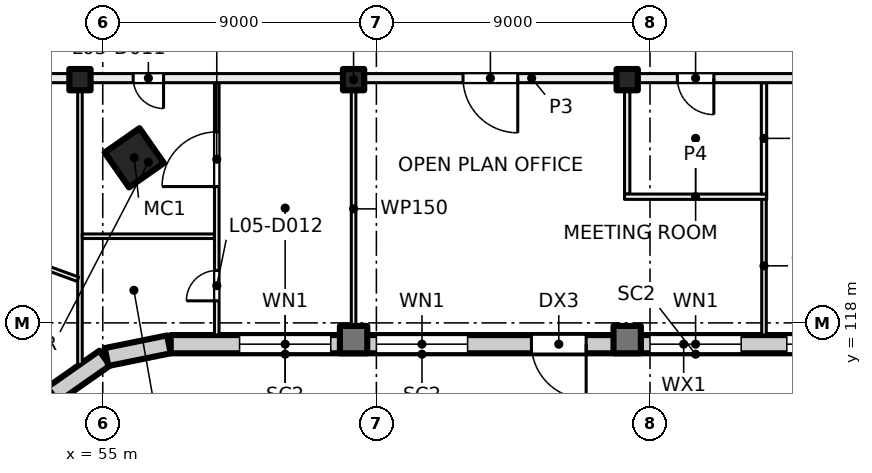
"""IFC4 building model, lengths in metres.
Left out: names, types, materials, properties, quantities, classifications, styles, units other than length and angle.
Written with IfcOpenShell. Run it as: python <this file> out.ifc"""

import sys

from ifc_helpers import new_model, si_unit, direction, frame, frame_2d, origin, origin_2d, place, context, subcontext, project, spatial, rectangle, hollow_rectangle, extrude, element, fill, save


model = new_model("IFC4")
c1 = context("Model", 3, precision=1e-05, world=origin(), true_north=direction((0.0, 1.0)))
c2 = subcontext(c1, "Body", "Model", "MODEL_VIEW")
j1 = project(units=[si_unit("LENGTHUNIT", "METRE"), si_unit("PLANEANGLEUNIT", "RADIAN")], contexts=[c1])
p1 = place(None, origin())
s1 = spatial("IfcSite", under=j1, at=p1, CompositionType="ELEMENT")
p2 = place(p1, origin())
s2 = spatial("IfcBuilding", under=s1, at=p2, CompositionType="ELEMENT")
p3 = place(p2, frame((0.0, 0.0, 27.5)))
s3 = spatial("IfcBuildingStorey", under=s2, at=p3, CompositionType="ELEMENT", Elevation=27.5)
p4 = place(p3, frame((56.036, 123.43, 0.0), z_axis=(0.0, 0.0, 1.0), x_axis=(0.573576436351, -0.819152044289, 0.0)))
e1 = element("IfcColumn", 1, at=p4, inside=s3, PredefinedType="COLUMN", context=c2, shape_type="SweptSolid", body=[
    extrude(hollow_rectangle(XDim=1.4, YDim=1.4, WallThickness=0.04, at=origin_2d()), origin(), (0.0, 0.0, 1.0), 4.0),
])
for number, where, z_axis, x_axis in (
    (2, (54.25, 126.0, 0.0), (0.0, 0.0, 1.0), (1.0, 0.0, 0.0)),
    (3, (63.25, 126.0, 0.0), (0.0, 0.0, 1.0), (1.0, 0.0, 0.0)),
    (4, (72.25, 126.0, 0.0), (0.0, 0.0, 1.0), (1.0, 0.0, 0.0)),
):
    element("IfcColumn", number, at=place(p3, frame(where, z_axis=z_axis, x_axis=x_axis)), inside=s3, PredefinedType="COLUMN", context=c2, shape_type="SweptSolid", body=[
        extrude(rectangle(XDim=0.7, YDim=0.7, at=origin_2d()), origin(), (0.0, 0.0, 1.0), 4.0),
    ])
for number, where, z_axis, x_axis in (
    (5, (63.25, 117.45, 0.0), (0.0, 0.0, 1.0), (1.0, 0.0, 0.0)),
    (6, (72.25, 117.45, 0.0), (0.0, 0.0, 1.0), (1.0, 0.0, 0.0)),
):
    element("IfcColumn", number, at=place(p3, frame(where, z_axis=z_axis, x_axis=x_axis)), inside=s3, PredefinedType="COLUMN", context=c2, shape_type="SweptSolid", body=[
        extrude(rectangle(XDim=0.9, YDim=0.9, at=origin_2d()), origin(), (0.0, 0.0, 1.0), 4.0),
    ])
p5 = place(p3, frame((53.305, 115.578, 0.0), z_axis=(0.0, 0.0, 1.0), x_axis=(-0.522402266438, -0.852699168535, 0.0)))
e7 = element("IfcWall", 7, at=p5, inside=s3, PredefinedType="SOLIDWALL", context=c2, shape_type="SweptSolid", body=[
    extrude(rectangle(XDim=2.042, YDim=0.6, at=frame_2d((1.021, 0.0))), origin(), (0.0, 0.0, 1.0), 3.625),
])
for number, where, z_axis, x_axis in (
    (8, (55.062, 116.839, 0.0), (0.0, 0.0, 1.0), (-0.819, -0.574, 0.0)),
    (9, (57.175, 117.294, 0.0), (0.0, 0.0, 1.0), (-0.98, -0.199, 0.0)),
):
    element("IfcWall", number, at=place(p3, frame(where, z_axis=z_axis, x_axis=x_axis)), inside=s3, PredefinedType="SOLIDWALL", context=c2, shape_type="SweptSolid", body=[
        extrude(rectangle(XDim=2.092, YDim=0.6, at=frame_2d((1.046, 0.0))), origin(), (0.0, 0.0, 1.0), 3.625),
    ])
p6 = place(p3, frame((90.98, 117.3, 0.0), z_axis=(0.0, 0.0, 1.0), x_axis=(-1.0, 0.0, 0.0)))
e10 = element("IfcWall", 10, at=p6, inside=s3, PredefinedType="SOLIDWALL", context=c2, shape_type="SweptSolid", body=[
    extrude(rectangle(XDim=33.745, YDim=0.6, at=frame_2d((16.873, 0.0))), origin(), (0.0, 0.0, 1.0), 3.625),
])
p7 = place(p6, frame((2.08, 0.0, 0.0)))
e11 = element("IfcOpeningElement", 11, at=p7, cuts=e10, PredefinedType="OPENING", context=c2, shape_type="SweptSolid", body=[
    extrude(rectangle(XDim=1.8, YDim=2.4, at=frame_2d((0.9, 1.2))), frame((0.0, 0.31, 0.0), z_axis=(0.0, -1.0, 0.0), x_axis=(1.0, 0.0, 0.0)), (0.0, 0.0, 1.0), 0.62),
])
p8 = place(p6, frame((5.98, 0.0, 0.9)))
e12 = element("IfcOpeningElement", 12, at=p8, cuts=e10, PredefinedType="OPENING", context=c2, shape_type="SweptSolid", body=[
    extrude(rectangle(XDim=3.0, YDim=2.4, at=frame_2d((1.5, 1.2))), frame((0.0, 0.31, 0.0), z_axis=(0.0, -1.0, 0.0), x_axis=(1.0, 0.0, 0.0)), (0.0, 0.0, 1.0), 0.62),
])
p9 = place(p6, frame((10.48, 0.0, 0.9)))
e13 = element("IfcOpeningElement", 13, at=p9, cuts=e10, PredefinedType="OPENING", context=c2, shape_type="SweptSolid", body=[
    extrude(rectangle(XDim=3.0, YDim=2.4, at=frame_2d((1.5, 1.2))), frame((0.0, 0.31, 0.0), z_axis=(0.0, -1.0, 0.0), x_axis=(1.0, 0.0, 0.0)), (0.0, 0.0, 1.0), 0.62),
])
p10 = place(p6, frame((14.98, 0.0, 0.9)))
e14 = element("IfcOpeningElement", 14, at=p10, cuts=e10, PredefinedType="OPENING", context=c2, shape_type="SweptSolid", body=[
    extrude(rectangle(XDim=3.0, YDim=2.4, at=frame_2d((1.5, 1.2))), frame((0.0, 0.31, 0.0), z_axis=(0.0, -1.0, 0.0), x_axis=(1.0, 0.0, 0.0)), (0.0, 0.0, 1.0), 0.62),
])
p11 = place(p6, frame((20.08, 0.0, 0.0)))
e15 = element("IfcOpeningElement", 15, at=p11, cuts=e10, PredefinedType="OPENING", context=c2, shape_type="SweptSolid", body=[
    extrude(rectangle(XDim=1.8, YDim=2.4, at=frame_2d((0.9, 1.2))), frame((0.0, 0.31, 0.0), z_axis=(0.0, -1.0, 0.0), x_axis=(1.0, 0.0, 0.0)), (0.0, 0.0, 1.0), 0.62),
])
p12 = place(p6, frame((23.98, 0.0, 0.9)))
e16 = element("IfcOpeningElement", 16, at=p12, cuts=e10, PredefinedType="OPENING", context=c2, shape_type="SweptSolid", body=[
    extrude(rectangle(XDim=3.0, YDim=2.4, at=frame_2d((1.5, 1.2))), frame((0.0, 0.31, 0.0), z_axis=(0.0, -1.0, 0.0), x_axis=(1.0, 0.0, 0.0)), (0.0, 0.0, 1.0), 0.62),
])
p13 = place(p6, frame((28.48, 0.0, 0.9)))
e17 = element("IfcOpeningElement", 17, at=p13, cuts=e10, PredefinedType="OPENING", context=c2, shape_type="SweptSolid", body=[
    extrude(rectangle(XDim=3.0, YDim=2.4, at=frame_2d((1.5, 1.2))), frame((0.0, 0.31, 0.0), z_axis=(0.0, -1.0, 0.0), x_axis=(1.0, 0.0, 0.0)), (0.0, 0.0, 1.0), 0.62),
])
p14 = place(p3, frame((54.25, 116.637, 0.0), z_axis=(0.0, 0.0, 1.0), x_axis=(0.0, 1.0, 0.0)))
e18 = element("IfcWall", 18, at=p14, inside=s3, PredefinedType="PARTITIONING", context=c2, shape_type="SweptSolid", body=[
    extrude(rectangle(XDim=9.263, YDim=0.15, at=frame_2d((4.631, 0.0))), origin(), (0.0, 0.0, 1.0), 3.625),
])
p15 = place(p3, frame((54.18, 119.436, 0.0), z_axis=(0.0, 0.0, 1.0), x_axis=(-0.939669476286, 0.342083725624, 0.0)))
e19 = element("IfcWall", 19, at=p15, inside=s3, PredefinedType="PARTITIONING", context=c2, shape_type="SweptSolid", body=[
    extrude(rectangle(XDim=8.516, YDim=0.15, at=frame_2d((4.258, 0.0))), origin(), (0.0, 0.0, 1.0), 3.625),
])
p16 = place(p3, frame((54.325, 120.85, 0.0), z_axis=(0.0, 0.0, 1.0), x_axis=(1.0, 0.0, 0.0)))
e20 = element("IfcWall", 20, at=p16, inside=s3, PredefinedType="PARTITIONING", context=c2, shape_type="SweptSolid", body=[
    extrude(rectangle(XDim=4.35, YDim=0.15, at=frame_2d((2.175, 0.0))), origin(), (0.0, 0.0, 1.0), 3.625),
])
p17 = place(p3, frame((58.75, 117.6, 0.0), z_axis=(0.0, 0.0, 1.0), x_axis=(0.0, 1.0, 0.0)))
e21 = element("IfcWall", 21, at=p17, inside=s3, PredefinedType="PARTITIONING", context=c2, shape_type="SweptSolid", body=[
    extrude(rectangle(XDim=8.3, YDim=0.15, at=frame_2d((4.15, 0.0))), origin(), (0.0, 0.0, 1.0), 3.625),
])
p18 = place(p17, frame((1.125, 0.0, 0.0)))
e22 = element("IfcOpeningElement", 22, at=p18, cuts=e21, PredefinedType="OPENING", context=c2, shape_type="SweptSolid", body=[
    extrude(rectangle(XDim=1.0, YDim=2.1, at=frame_2d((0.5, 1.05))), frame((0.0, 0.085, 0.0), z_axis=(0.0, -1.0, 0.0), x_axis=(1.0, 0.0, 0.0)), (0.0, 0.0, 1.0), 0.17),
])
p19 = place(p17, frame((4.884, 0.0, 0.0)))
e23 = element("IfcOpeningElement", 23, at=p19, cuts=e21, PredefinedType="OPENING", context=c2, shape_type="SweptSolid", body=[
    extrude(rectangle(XDim=1.8, YDim=2.1, at=frame_2d((0.9, 1.05))), frame((0.0, 0.085, 0.0), z_axis=(0.0, -1.0, 0.0), x_axis=(1.0, 0.0, 0.0)), (0.0, 0.0, 1.0), 0.17),
])
p20 = place(p3, frame((63.25, 117.6, 0.0), z_axis=(0.0, 0.0, 1.0), x_axis=(0.0, 1.0, 0.0)))
e24 = element("IfcWall", 24, at=p20, inside=s3, PredefinedType="PARTITIONING", context=c2, shape_type="SweptSolid", body=[
    extrude(rectangle(XDim=8.3, YDim=0.15, at=frame_2d((4.15, 0.0))), origin(), (0.0, 0.0, 1.0), 3.625),
])
p21 = place(p3, frame((72.25, 122.238, 0.0), z_axis=(0.0, 0.0, 1.0), x_axis=(0.0, 1.0, 0.0)))
e25 = element("IfcWall", 25, at=p21, inside=s3, PredefinedType="PARTITIONING", context=c2, shape_type="SweptSolid", body=[
    extrude(rectangle(XDim=3.662, YDim=0.175, at=frame_2d((1.831, 0.0))), origin(), (0.0, 0.0, 1.0), 3.625),
])
p22 = place(p3, frame((76.75, 117.6, 0.0), z_axis=(0.0, 0.0, 1.0), x_axis=(0.0, 1.0, 0.0)))
e26 = element("IfcWall", 26, at=p22, inside=s3, PredefinedType="PARTITIONING", context=c2, shape_type="SweptSolid", body=[
    extrude(rectangle(XDim=4.553, YDim=0.15, at=frame_2d((2.276, 0.0))), origin(), (0.0, 0.0, 1.0), 3.625),
])
p23 = place(p3, frame((76.838, 122.15, 0.0), z_axis=(0.0, 0.0, 1.0), x_axis=(-1.0, 0.0, 0.0)))
e27 = element("IfcWall", 27, at=p23, inside=s3, PredefinedType="PARTITIONING", context=c2, shape_type="SweptSolid", body=[
    extrude(rectangle(XDim=4.676, YDim=0.175, at=frame_2d((2.338, 0.0))), origin(), (0.0, 0.0, 1.0), 3.625),
])
p24 = place(p3, frame((76.75, 122.238, 0.0), z_axis=(0.0, 0.0, 1.0), x_axis=(0.0, 1.0, 0.0)))
e28 = element("IfcWall", 28, at=p24, inside=s3, PredefinedType="PARTITIONING", context=c2, shape_type="SweptSolid", body=[
    extrude(rectangle(XDim=3.662, YDim=0.175, at=frame_2d((1.831, 0.0))), origin(), (0.0, 0.0, 1.0), 3.625),
])
p25 = place(p3, frame((91.0, 126.05, 0.0), z_axis=(0.0, 0.0, 1.0), x_axis=(-1.0, 0.0, 0.0)))
e29 = element("IfcWall", 29, at=p25, inside=s3, PredefinedType="PARTITIONING", context=c2, shape_type="SweptSolid", body=[
    extrude(rectangle(XDim=43.785, YDim=0.3, at=frame_2d((21.893, 0.0))), origin(), (0.0, 0.0, 1.0), 3.625),
])
p26 = place(p25, frame((2.125, 0.0, 0.0)))
e30 = element("IfcOpeningElement", 30, at=p26, cuts=e29, PredefinedType="OPENING", context=c2, shape_type="SweptSolid", body=[
    extrude(rectangle(XDim=1.0, YDim=2.1, at=frame_2d((0.5, 1.05))), frame((0.0, 0.16, 0.0), z_axis=(0.0, -1.0, 0.0), x_axis=(1.0, 0.0, 0.0)), (0.0, 0.0, 1.0), 0.32),
])
p27 = place(p25, frame((7.0, 0.0, 0.0)))
e31 = element("IfcOpeningElement", 31, at=p27, cuts=e29, PredefinedType="OPENING", context=c2, shape_type="SweptSolid", body=[
    extrude(rectangle(XDim=1.0, YDim=2.1, at=frame_2d((0.5, 1.05))), frame((0.0, 0.16, 0.0), z_axis=(0.0, -1.0, 0.0), x_axis=(1.0, 0.0, 0.0)), (0.0, 0.0, 1.0), 0.32),
])
p28 = place(p25, frame((11.5, 0.0, 0.0)))
e32 = element("IfcOpeningElement", 32, at=p28, cuts=e29, PredefinedType="OPENING", context=c2, shape_type="SweptSolid", body=[
    extrude(rectangle(XDim=1.0, YDim=2.1, at=frame_2d((0.5, 1.05))), frame((0.0, 0.16, 0.0), z_axis=(0.0, -1.0, 0.0), x_axis=(1.0, 0.0, 0.0)), (0.0, 0.0, 1.0), 0.32),
])
p29 = place(p25, frame((15.9, 0.0, 0.0)))
e33 = element("IfcOpeningElement", 33, at=p29, cuts=e29, PredefinedType="OPENING", context=c2, shape_type="SweptSolid", body=[
    extrude(rectangle(XDim=1.2, YDim=2.1, at=frame_2d((0.6, 1.05))), frame((0.0, 0.16, 0.0), z_axis=(0.0, -1.0, 0.0), x_axis=(1.0, 0.0, 0.0)), (0.0, 0.0, 1.0), 0.32),
])
p30 = place(p25, frame((22.35, 0.0, 0.0)))
e34 = element("IfcOpeningElement", 34, at=p30, cuts=e29, PredefinedType="OPENING", context=c2, shape_type="SweptSolid", body=[
    extrude(rectangle(XDim=1.8, YDim=2.1, at=frame_2d((0.9, 1.05))), frame((0.0, 0.16, 0.0), z_axis=(0.0, -1.0, 0.0), x_axis=(1.0, 0.0, 0.0)), (0.0, 0.0, 1.0), 0.32),
])
p31 = place(p25, frame((34.0, 0.0, 0.0)))
e35 = element("IfcOpeningElement", 35, at=p31, cuts=e29, PredefinedType="OPENING", context=c2, shape_type="SweptSolid", body=[
    extrude(rectangle(XDim=1.0, YDim=2.1, at=frame_2d((0.5, 1.05))), frame((0.0, 0.16, 0.0), z_axis=(0.0, -1.0, 0.0), x_axis=(1.0, 0.0, 0.0)), (0.0, 0.0, 1.0), 0.32),
])
p32 = place(p25, frame((39.296, 0.0, 0.0)))
e36 = element("IfcOpeningElement", 36, at=p32, cuts=e29, PredefinedType="OPENING", context=c2, shape_type="SweptSolid", body=[
    extrude(rectangle(XDim=1.8, YDim=2.1, at=frame_2d((0.9, 1.05))), frame((0.0, 0.16, 0.0), z_axis=(0.0, -1.0, 0.0), x_axis=(1.0, 0.0, 0.0)), (0.0, 0.0, 1.0), 0.32),
])
p33 = place(p9, origin())
e37 = element("IfcWindow", 37, at=p33, inside=s3, PartitioningType="SINGLE_PANEL", PredefinedType="WINDOW", context=c2, shape_type="SweptSolid", body=[
    extrude(rectangle(XDim=3.0, YDim=2.4, at=frame_2d((1.5, 1.2))), frame((0.0, 0.03, 0.0), z_axis=(0.0, -1.0, 0.0), x_axis=(1.0, 0.0, 0.0)), (0.0, 0.0, 1.0), 0.06),
])
fill(e13, e37)
p34 = place(p10, origin())
e38 = element("IfcWindow", 38, at=p34, inside=s3, PartitioningType="SINGLE_PANEL", PredefinedType="WINDOW", context=c2, shape_type="SweptSolid", body=[
    extrude(rectangle(XDim=3.0, YDim=2.4, at=frame_2d((1.5, 1.2))), frame((0.0, 0.03, 0.0), z_axis=(0.0, -1.0, 0.0), x_axis=(1.0, 0.0, 0.0)), (0.0, 0.0, 1.0), 0.06),
])
fill(e14, e38)
p35 = place(p11, origin())
e39 = element("IfcDoor", 39, at=p35, inside=s3, OperationType="DOUBLE_DOOR_SINGLE_SWING", PredefinedType="DOOR", context=c2, shape_type="SweptSolid", body=[
    extrude(rectangle(XDim=1.8, YDim=2.4, at=frame_2d((0.9, 1.2))), frame((0.0, 0.025, 0.0), z_axis=(0.0, -1.0, 0.0), x_axis=(1.0, 0.0, 0.0)), (0.0, 0.0, 1.0), 0.05),
])
fill(e15, e39)
p36 = place(p12, origin())
e40 = element("IfcWindow", 40, at=p36, inside=s3, PartitioningType="SINGLE_PANEL", PredefinedType="WINDOW", context=c2, shape_type="SweptSolid", body=[
    extrude(rectangle(XDim=3.0, YDim=2.4, at=frame_2d((1.5, 1.2))), frame((0.0, 0.03, 0.0), z_axis=(0.0, -1.0, 0.0), x_axis=(1.0, 0.0, 0.0)), (0.0, 0.0, 1.0), 0.06),
])
fill(e16, e40)
p37 = place(p13, origin())
e41 = element("IfcWindow", 41, at=p37, inside=s3, PartitioningType="SINGLE_PANEL", PredefinedType="WINDOW", context=c2, shape_type="SweptSolid", body=[
    extrude(rectangle(XDim=3.0, YDim=2.4, at=frame_2d((1.5, 1.2))), frame((0.0, 0.03, 0.0), z_axis=(0.0, -1.0, 0.0), x_axis=(1.0, 0.0, 0.0)), (0.0, 0.0, 1.0), 0.06),
])
fill(e17, e41)
p38 = place(p29, origin())
e42 = element("IfcDoor", 42, at=p38, inside=s3, OperationType="DOUBLE_DOOR_SINGLE_SWING", PredefinedType="DOOR", context=c2, shape_type="SweptSolid", body=[
    extrude(rectangle(XDim=1.2, YDim=2.1, at=frame_2d((0.6, 1.05))), frame((0.0, 0.025, 0.0), z_axis=(0.0, -1.0, 0.0), x_axis=(1.0, 0.0, 0.0)), (0.0, 0.0, 1.0), 0.05),
])
fill(e33, e42)
p39 = place(p30, origin())
e43 = element("IfcDoor", 43, at=p39, inside=s3, OperationType="DOUBLE_DOOR_SINGLE_SWING", PredefinedType="DOOR", context=c2, shape_type="SweptSolid", body=[
    extrude(rectangle(XDim=1.8, YDim=2.1, at=frame_2d((0.9, 1.05))), frame((0.0, 0.025, 0.0), z_axis=(0.0, -1.0, 0.0), x_axis=(1.0, 0.0, 0.0)), (0.0, 0.0, 1.0), 0.05),
])
fill(e34, e43)
p40 = place(p31, origin())
e44 = element("IfcDoor", 44, at=p40, inside=s3, OperationType="SINGLE_SWING_LEFT", PredefinedType="DOOR", context=c2, shape_type="SweptSolid", body=[
    extrude(rectangle(XDim=1.0, YDim=2.1, at=frame_2d((0.5, 1.05))), frame((0.0, 0.025, 0.0), z_axis=(0.0, -1.0, 0.0), x_axis=(1.0, 0.0, 0.0)), (0.0, 0.0, 1.0), 0.05),
])
fill(e35, e44)
p41 = place(p18, origin())
e45 = element("IfcDoor", 45, at=p41, inside=s3, OperationType="SINGLE_SWING_RIGHT", PredefinedType="DOOR", context=c2, shape_type="SweptSolid", body=[
    extrude(rectangle(XDim=1.0, YDim=2.1, at=frame_2d((0.5, 1.05))), frame((0.0, 0.025, 0.0), z_axis=(0.0, -1.0, 0.0), x_axis=(1.0, 0.0, 0.0)), (0.0, 0.0, 1.0), 0.05),
])
fill(e22, e45)
p42 = place(p19, origin())
e46 = element("IfcDoor", 46, at=p42, inside=s3, OperationType="DOUBLE_DOOR_SINGLE_SWING", PredefinedType="DOOR", context=c2, shape_type="SweptSolid", body=[
    extrude(rectangle(XDim=1.8, YDim=2.1, at=frame_2d((0.9, 1.05))), frame((0.0, 0.025, 0.0), z_axis=(0.0, -1.0, 0.0), x_axis=(1.0, 0.0, 0.0)), (0.0, 0.0, 1.0), 0.05),
])
fill(e23, e46)
save(model, sys.argv[1])
